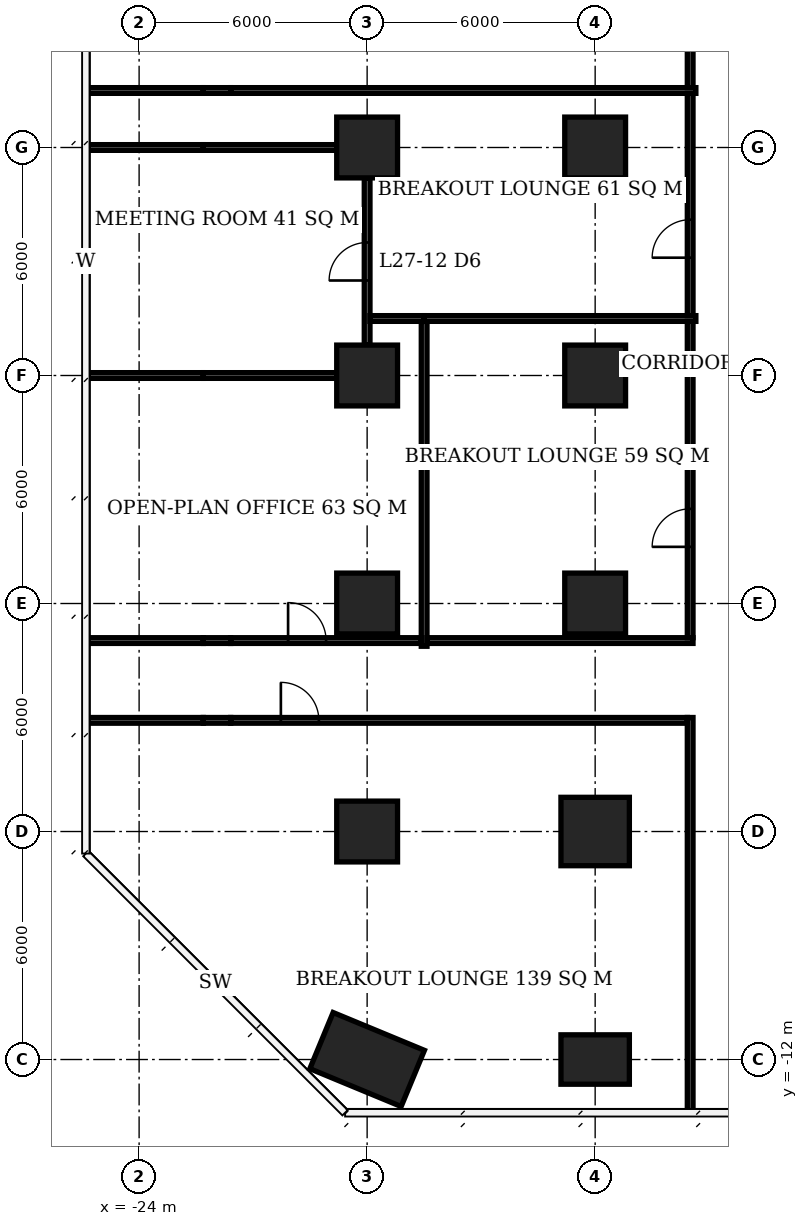
"""IFC4 building model, lengths in metres.
Left out: names, types, materials, properties, quantities, classifications, styles, units other than length and angle.
Written with IfcOpenShell. Run it as: python <this file> out.ifc"""

import sys

from ifc_helpers import new_model, si_unit, direction, frame, frame_2d, origin, origin_2d, place, context, subcontext, project, spatial, rectangle, extrude, element, fill, save


model = new_model("IFC4")
c1 = context("Model", 3, precision=1e-05, world=origin(), true_north=direction((0.0, 1.0)))
c2 = subcontext(c1, "Body", "Model", "MODEL_VIEW")
j1 = project(units=[si_unit("LENGTHUNIT", "METRE"), si_unit("PLANEANGLEUNIT", "RADIAN")], contexts=[c1])
p1 = place(None, origin())
s1 = spatial("IfcSite", under=j1, at=p1, CompositionType="ELEMENT")
p2 = place(p1, origin())
s2 = spatial("IfcBuilding", under=s1, at=p2, CompositionType="ELEMENT")
p3 = place(p2, frame((0.0, 0.0, 113.3)))
s3 = spatial("IfcBuildingStorey", under=s2, at=p3, CompositionType="ELEMENT", Elevation=113.3)
p4 = place(p3, frame((-18.0, -12.0, 0.0), z_axis=(0.0, 0.0, 1.0), x_axis=(-0.923879532511, 0.382683432365, 0.0)))
e1 = element("IfcColumn", 1, at=p4, inside=s3, PredefinedType="COLUMN", context=c2, shape_type="SweptSolid", body=[
    extrude(rectangle(XDim=2.6, YDim=1.6, at=origin_2d()), origin(), (0.0, 0.0, 1.0), 3.9),
])
for number, where, z_axis, x_axis in (
    (2, (-18.0, -6.0, 0.0), (0.0, 0.0, 1.0), (1.0, 0.0, 0.0)),
    (3, (-18.0, 0.0, 0.0), (0.0, 0.0, 1.0), (1.0, 0.0, 0.0)),
    (4, (-18.0, 6.0, 0.0), (0.0, 0.0, 1.0), (1.0, 0.0, 0.0)),
    (5, (-18.0, 12.0, 0.0), (0.0, 0.0, 1.0), (1.0, 0.0, 0.0)),
):
    element("IfcColumn", number, at=place(p3, frame(where, z_axis=z_axis, x_axis=x_axis)), inside=s3, PredefinedType="COLUMN", context=c2, shape_type="SweptSolid", body=[
        extrude(rectangle(XDim=1.6, YDim=1.6, at=origin_2d()), origin(), (0.0, 0.0, 1.0), 3.9),
    ])
p5 = place(p3, frame((-12.0, -12.0, 0.0), z_axis=(0.0, 0.0, 1.0), x_axis=(1.0, 0.0, 0.0)))
e6 = element("IfcColumn", 6, at=p5, inside=s3, PredefinedType="COLUMN", context=c2, shape_type="SweptSolid", body=[
    extrude(rectangle(XDim=1.8, YDim=1.3, at=origin_2d()), origin(), (0.0, 0.0, 1.0), 3.9),
])
p6 = place(p3, frame((-12.0, -6.0, 0.0), z_axis=(0.0, 0.0, 1.0), x_axis=(1.0, 0.0, 0.0)))
e7 = element("IfcColumn", 7, at=p6, inside=s3, PredefinedType="COLUMN", context=c2, shape_type="SweptSolid", body=[
    extrude(rectangle(XDim=1.8, YDim=1.8, at=origin_2d()), origin(), (0.0, 0.0, 1.0), 3.9),
])
for number, where, z_axis, x_axis in (
    (8, (-12.0, 0.0, 0.0), (0.0, 0.0, 1.0), (1.0, 0.0, 0.0)),
    (9, (-12.0, 6.0, 0.0), (0.0, 0.0, 1.0), (1.0, 0.0, 0.0)),
    (10, (-12.0, 12.0, 0.0), (0.0, 0.0, 1.0), (1.0, 0.0, 0.0)),
):
    element("IfcColumn", number, at=place(p3, frame(where, z_axis=z_axis, x_axis=x_axis)), inside=s3, PredefinedType="COLUMN", context=c2, shape_type="SweptSolid", body=[
        extrude(rectangle(XDim=1.6, YDim=1.6, at=origin_2d()), origin(), (0.0, 0.0, 1.0), 3.9),
    ])
p7 = place(p3, frame((-25.35, 6.0, 0.0), z_axis=(0.0, 0.0, 1.0), x_axis=(1.0, 0.0, 0.0)))
e11 = element("IfcWall", 11, at=p7, inside=s3, PredefinedType="PARTITIONING", context=c2, shape_type="SweptSolid", body=[
    extrude(rectangle(XDim=3.04, YDim=0.15, at=frame_2d((1.52, 0.0))), origin(), (0.0, 0.0, 1.0), 3.65),
])
p8 = place(p3, frame((-22.31, 6.0, 0.0), z_axis=(0.0, 0.0, 1.0), x_axis=(1.0, 0.0, 0.0)))
e12 = element("IfcWall", 12, at=p8, inside=s3, PredefinedType="PARTITIONING", context=c2, shape_type="SweptSolid", body=[
    extrude(rectangle(XDim=3.51, YDim=0.15, at=frame_2d((1.755, 0.0))), origin(), (0.0, 0.0, 1.0), 2.65),
])
p9 = place(p3, frame((-25.35, 12.0, 0.0), z_axis=(0.0, 0.0, 1.0), x_axis=(1.0, 0.0, 0.0)))
e13 = element("IfcWall", 13, at=p9, inside=s3, PredefinedType="PARTITIONING", context=c2, shape_type="SweptSolid", body=[
    extrude(rectangle(XDim=3.04, YDim=0.15, at=frame_2d((1.52, 0.0))), origin(), (0.0, 0.0, 1.0), 3.65),
])
p10 = place(p3, frame((-22.31, 12.0, 0.0), z_axis=(0.0, 0.0, 1.0), x_axis=(1.0, 0.0, 0.0)))
e14 = element("IfcWall", 14, at=p10, inside=s3, PredefinedType="PARTITIONING", context=c2, shape_type="SweptSolid", body=[
    extrude(rectangle(XDim=3.51, YDim=0.15, at=frame_2d((1.755, 0.0))), origin(), (0.0, 0.0, 1.0), 2.65),
])
p11 = place(p3, frame((-18.0, 6.8, 0.0), z_axis=(0.0, 0.0, 1.0), x_axis=(0.0, 1.0, 0.0)))
e15 = element("IfcWall", 15, at=p11, inside=s3, PredefinedType="PARTITIONING", context=c2, shape_type="SweptSolid", body=[
    extrude(rectangle(XDim=4.4, YDim=0.15, at=frame_2d((2.2, 0.0))), origin(), (0.0, 0.0, 1.0), 3.65),
])
p12 = place(p11, frame((1.7, 0.0, 0.0)))
e16 = element("IfcOpeningElement", 16, at=p12, cuts=e15, PredefinedType="OPENING", context=c2, shape_type="SweptSolid", body=[
    extrude(rectangle(XDim=1.0, YDim=2.1, at=frame_2d((0.5, 1.05))), frame((0.0, 0.085, 0.0), z_axis=(0.0, -1.0, 0.0), x_axis=(1.0, 0.0, 0.0)), (0.0, 0.0, 1.0), 0.17),
])
p13 = place(p3, frame((-25.4, -3.075, 0.0), z_axis=(0.0, 0.0, 1.0), x_axis=(1.0, 0.0, 0.0)))
e17 = element("IfcWall", 17, at=p13, inside=s3, PredefinedType="PARTITIONING", context=c2, shape_type="SweptSolid", body=[
    extrude(rectangle(XDim=3.09, YDim=0.15, at=frame_2d((1.545, 0.0))), origin(), (0.0, 0.0, 1.0), 3.65),
])
p14 = place(p3, frame((-22.31, -3.075, 0.0), z_axis=(0.0, 0.0, 1.0), x_axis=(1.0, 0.0, 0.0)))
e18 = element("IfcWall", 18, at=p14, inside=s3, PredefinedType="PARTITIONING", context=c2, shape_type="SweptSolid", body=[
    extrude(rectangle(XDim=0.72, YDim=0.15, at=frame_2d((0.36, 0.0))), origin(), (0.0, 0.0, 1.0), 2.65),
])
p15 = place(p3, frame((-21.59, -3.075, 0.0), z_axis=(0.0, 0.0, 1.0), x_axis=(1.0, 0.0, 0.0)))
e19 = element("IfcWall", 19, at=p15, inside=s3, PredefinedType="PARTITIONING", context=c2, shape_type="SweptSolid", body=[
    extrude(rectangle(XDim=12.015, YDim=0.15, at=frame_2d((6.008, 0.0))), origin(), (0.0, 0.0, 1.0), 3.65),
])
p16 = place(p15, frame((1.32, 0.0, 0.0)))
e20 = element("IfcOpeningElement", 20, at=p16, cuts=e19, PredefinedType="OPENING", context=c2, shape_type="SweptSolid", body=[
    extrude(rectangle(XDim=1.0, YDim=2.1, at=frame_2d((0.5, 1.05))), frame((0.0, 0.085, 0.0), z_axis=(0.0, -1.0, 0.0), x_axis=(1.0, 0.0, 0.0)), (0.0, 0.0, 1.0), 0.17),
])
p17 = place(p3, frame((-25.4, -0.975, 0.0), z_axis=(0.0, 0.0, 1.0), x_axis=(1.0, 0.0, 0.0)))
e21 = element("IfcWall", 21, at=p17, inside=s3, PredefinedType="PARTITIONING", context=c2, shape_type="SweptSolid", body=[
    extrude(rectangle(XDim=3.09, YDim=0.15, at=frame_2d((1.545, 0.0))), origin(), (0.0, 0.0, 1.0), 3.65),
])
p18 = place(p3, frame((-22.31, -0.975, 0.0), z_axis=(0.0, 0.0, 1.0), x_axis=(1.0, 0.0, 0.0)))
e22 = element("IfcWall", 22, at=p18, inside=s3, PredefinedType="PARTITIONING", context=c2, shape_type="SweptSolid", body=[
    extrude(rectangle(XDim=0.72, YDim=0.15, at=frame_2d((0.36, 0.0))), origin(), (0.0, 0.0, 1.0), 2.65),
])
p19 = place(p3, frame((-21.59, -0.975, 0.0), z_axis=(0.0, 0.0, 1.0), x_axis=(1.0, 0.0, 0.0)))
e23 = element("IfcWall", 23, at=p19, inside=s3, PredefinedType="PARTITIONING", context=c2, shape_type="SweptSolid", body=[
    extrude(rectangle(XDim=5.015, YDim=0.15, at=frame_2d((2.508, 0.0))), origin(), (0.0, 0.0, 1.0), 3.65),
])
p20 = place(p19, frame((1.51, 0.0, 0.0)))
e24 = element("IfcOpeningElement", 24, at=p20, cuts=e23, PredefinedType="OPENING", context=c2, shape_type="SweptSolid", body=[
    extrude(rectangle(XDim=1.0, YDim=2.1, at=frame_2d((0.5, 1.05))), frame((0.0, 0.085, 0.0), z_axis=(0.0, -1.0, 0.0), x_axis=(1.0, 0.0, 0.0)), (0.0, 0.0, 1.0), 0.17),
])
p21 = place(p3, frame((-25.4, 13.5, 0.0), z_axis=(0.0, 0.0, 1.0), x_axis=(1.0, 0.0, 0.0)))
e25 = element("IfcWall", 25, at=p21, inside=s3, PredefinedType="PARTITIONING", context=c2, shape_type="SweptSolid", body=[
    extrude(rectangle(XDim=3.09, YDim=0.15, at=frame_2d((1.545, 0.0))), origin(), (0.0, 0.0, 1.0), 3.65),
])
p22 = place(p3, frame((-22.31, 13.5, 0.0), z_axis=(0.0, 0.0, 1.0), x_axis=(1.0, 0.0, 0.0)))
e26 = element("IfcWall", 26, at=p22, inside=s3, PredefinedType="PARTITIONING", context=c2, shape_type="SweptSolid", body=[
    extrude(rectangle(XDim=0.72, YDim=0.15, at=frame_2d((0.36, 0.0))), origin(), (0.0, 0.0, 1.0), 2.65),
])
p23 = place(p3, frame((-21.59, 13.5, 0.0), z_axis=(0.0, 0.0, 1.0), x_axis=(1.0, 0.0, 0.0)))
e27 = element("IfcWall", 27, at=p23, inside=s3, PredefinedType="PARTITIONING", context=c2, shape_type="SweptSolid", body=[
    extrude(rectangle(XDim=12.24, YDim=0.15, at=frame_2d((6.12, 0.0))), origin(), (0.0, 0.0, 1.0), 3.65),
])
p24 = place(p3, frame((-17.925, 7.5, 0.0), z_axis=(0.0, 0.0, 1.0), x_axis=(1.0, 0.0, 0.0)))
e28 = element("IfcWall", 28, at=p24, inside=s3, PredefinedType="PARTITIONING", context=c2, shape_type="SweptSolid", body=[
    extrude(rectangle(XDim=1.425, YDim=0.15, at=frame_2d((0.712, 0.0))), origin(), (0.0, 0.0, 1.0), 3.65),
])
p25 = place(p3, frame((-16.5, -1.125, 0.0), z_axis=(0.0, 0.0, 1.0), x_axis=(0.0, 1.0, 0.0)))
e29 = element("IfcWall", 29, at=p25, inside=s3, PredefinedType="PARTITIONING", context=c2, shape_type="SweptSolid", body=[
    extrude(rectangle(XDim=8.55, YDim=0.15, at=frame_2d((4.275, 0.0))), origin(), (0.0, 0.0, 1.0), 3.65),
])
p26 = place(p3, frame((-16.425, -0.975, 0.0), z_axis=(0.0, 0.0, 1.0), x_axis=(1.0, 0.0, 0.0)))
e30 = element("IfcWall", 30, at=p26, inside=s3, PredefinedType="PARTITIONING", context=c2, shape_type="SweptSolid", body=[
    extrude(rectangle(XDim=7.0, YDim=0.15, at=frame_2d((3.5, 0.0))), origin(), (0.0, 0.0, 1.0), 3.65),
])
p27 = place(p3, frame((-16.5, 7.5, 0.0), z_axis=(0.0, 0.0, 1.0), x_axis=(1.0, 0.0, 0.0)))
e31 = element("IfcWall", 31, at=p27, inside=s3, PredefinedType="PARTITIONING", context=c2, shape_type="SweptSolid", body=[
    extrude(rectangle(XDim=7.15, YDim=0.15, at=frame_2d((3.575, 0.0))), origin(), (0.0, 0.0, 1.0), 3.65),
])
p28 = place(p3, frame((-9.5, -13.4, 0.0), z_axis=(0.0, 0.0, 1.0), x_axis=(0.0, 1.0, 0.0)))
e32 = element("IfcWall", 32, at=p28, inside=s3, PredefinedType="PARTITIONING", context=c2, shape_type="SweptSolid", body=[
    extrude(rectangle(XDim=10.4, YDim=0.15, at=frame_2d((5.2, 0.0))), origin(), (0.0, 0.0, 1.0), 3.65),
])
p29 = place(p3, frame((-9.5, -0.9, 0.0), z_axis=(0.0, 0.0, 1.0), x_axis=(0.0, 1.0, 0.0)))
e33 = element("IfcWall", 33, at=p29, inside=s3, PredefinedType="PARTITIONING", context=c2, shape_type="SweptSolid", body=[
    extrude(rectangle(XDim=8.325, YDim=0.15, at=frame_2d((4.163, 0.0))), origin(), (0.0, 0.0, 1.0), 3.65),
])
p30 = place(p29, frame((2.391, 0.0, 0.0)))
e34 = element("IfcOpeningElement", 34, at=p30, cuts=e33, PredefinedType="OPENING", context=c2, shape_type="SweptSolid", body=[
    extrude(rectangle(XDim=1.0, YDim=2.1, at=frame_2d((0.5, 1.05))), frame((0.0, 0.085, 0.0), z_axis=(0.0, -1.0, 0.0), x_axis=(1.0, 0.0, 0.0)), (0.0, 0.0, 1.0), 0.17),
])
p31 = place(p3, frame((-9.5, 7.575, 0.0), z_axis=(0.0, 0.0, 1.0), x_axis=(0.0, 1.0, 0.0)))
e35 = element("IfcWall", 35, at=p31, inside=s3, PredefinedType="PARTITIONING", context=c2, shape_type="SweptSolid", body=[
    extrude(rectangle(XDim=5.85, YDim=0.15, at=frame_2d((2.925, 0.0))), origin(), (0.0, 0.0, 1.0), 3.65),
])
p32 = place(p31, frame((1.525, 0.0, 0.0)))
e36 = element("IfcOpeningElement", 36, at=p32, cuts=e35, PredefinedType="OPENING", context=c2, shape_type="SweptSolid", body=[
    extrude(rectangle(XDim=1.0, YDim=2.1, at=frame_2d((0.5, 1.05))), frame((0.0, 0.085, 0.0), z_axis=(0.0, -1.0, 0.0), x_axis=(1.0, 0.0, 0.0)), (0.0, 0.0, 1.0), 0.17),
])
p33 = place(p3, frame((-9.5, 13.575, 0.0), z_axis=(0.0, 0.0, 1.0), x_axis=(0.0, 1.0, 0.0)))
e37 = element("IfcWall", 37, at=p33, inside=s3, PredefinedType="PARTITIONING", context=c2, shape_type="SweptSolid", body=[
    extrude(rectangle(XDim=5.85, YDim=0.15, at=frame_2d((2.925, 0.0))), origin(), (0.0, 0.0, 1.0), 3.65),
])
p34 = place(p33, frame((1.525, 0.0, 0.0)))
e38 = element("IfcOpeningElement", 38, at=p34, cuts=e37, PredefinedType="OPENING", context=c2, shape_type="SweptSolid", body=[
    extrude(rectangle(XDim=1.0, YDim=2.1, at=frame_2d((0.5, 1.05))), frame((0.0, 0.085, 0.0), z_axis=(0.0, -1.0, 0.0), x_axis=(1.0, 0.0, 0.0)), (0.0, 0.0, 1.0), 0.17),
])
p35 = place(p12, origin())
e39 = element("IfcDoor", 39, at=p35, inside=s3, OperationType="SINGLE_SWING_LEFT", PredefinedType="DOOR", context=c2, shape_type="SweptSolid", body=[
    extrude(rectangle(XDim=1.0, YDim=2.1, at=frame_2d((0.5, 1.05))), frame((0.0, 0.025, 0.0), z_axis=(0.0, -1.0, 0.0), x_axis=(1.0, 0.0, 0.0)), (0.0, 0.0, 1.0), 0.05),
])
fill(e16, e39)
p36 = place(p16, origin())
e40 = element("IfcDoor", 40, at=p36, inside=s3, OperationType="SINGLE_SWING_LEFT", PredefinedType="DOOR", context=c2, shape_type="SweptSolid", body=[
    extrude(rectangle(XDim=1.0, YDim=2.1, at=frame_2d((0.5, 1.05))), frame((0.0, 0.025, 0.0), z_axis=(0.0, -1.0, 0.0), x_axis=(1.0, 0.0, 0.0)), (0.0, 0.0, 1.0), 0.05),
])
fill(e20, e40)
p37 = place(p20, origin())
e41 = element("IfcDoor", 41, at=p37, inside=s3, OperationType="SINGLE_SWING_LEFT", PredefinedType="DOOR", context=c2, shape_type="SweptSolid", body=[
    extrude(rectangle(XDim=1.0, YDim=2.1, at=frame_2d((0.5, 1.05))), frame((0.0, 0.025, 0.0), z_axis=(0.0, -1.0, 0.0), x_axis=(1.0, 0.0, 0.0)), (0.0, 0.0, 1.0), 0.05),
])
fill(e24, e41)
p38 = place(p30, origin())
e42 = element("IfcDoor", 42, at=p38, inside=s3, OperationType="SINGLE_SWING_LEFT", PredefinedType="DOOR", context=c2, shape_type="SweptSolid", body=[
    extrude(rectangle(XDim=1.0, YDim=2.1, at=frame_2d((0.5, 1.05))), frame((0.0, 0.025, 0.0), z_axis=(0.0, -1.0, 0.0), x_axis=(1.0, 0.0, 0.0)), (0.0, 0.0, 1.0), 0.05),
])
fill(e34, e42)
p39 = place(p32, origin())
e43 = element("IfcDoor", 43, at=p39, inside=s3, OperationType="SINGLE_SWING_LEFT", PredefinedType="DOOR", context=c2, shape_type="SweptSolid", body=[
    extrude(rectangle(XDim=1.0, YDim=2.1, at=frame_2d((0.5, 1.05))), frame((0.0, 0.025, 0.0), z_axis=(0.0, -1.0, 0.0), x_axis=(1.0, 0.0, 0.0)), (0.0, 0.0, 1.0), 0.05),
])
fill(e36, e43)
save(model, sys.argv[1])
